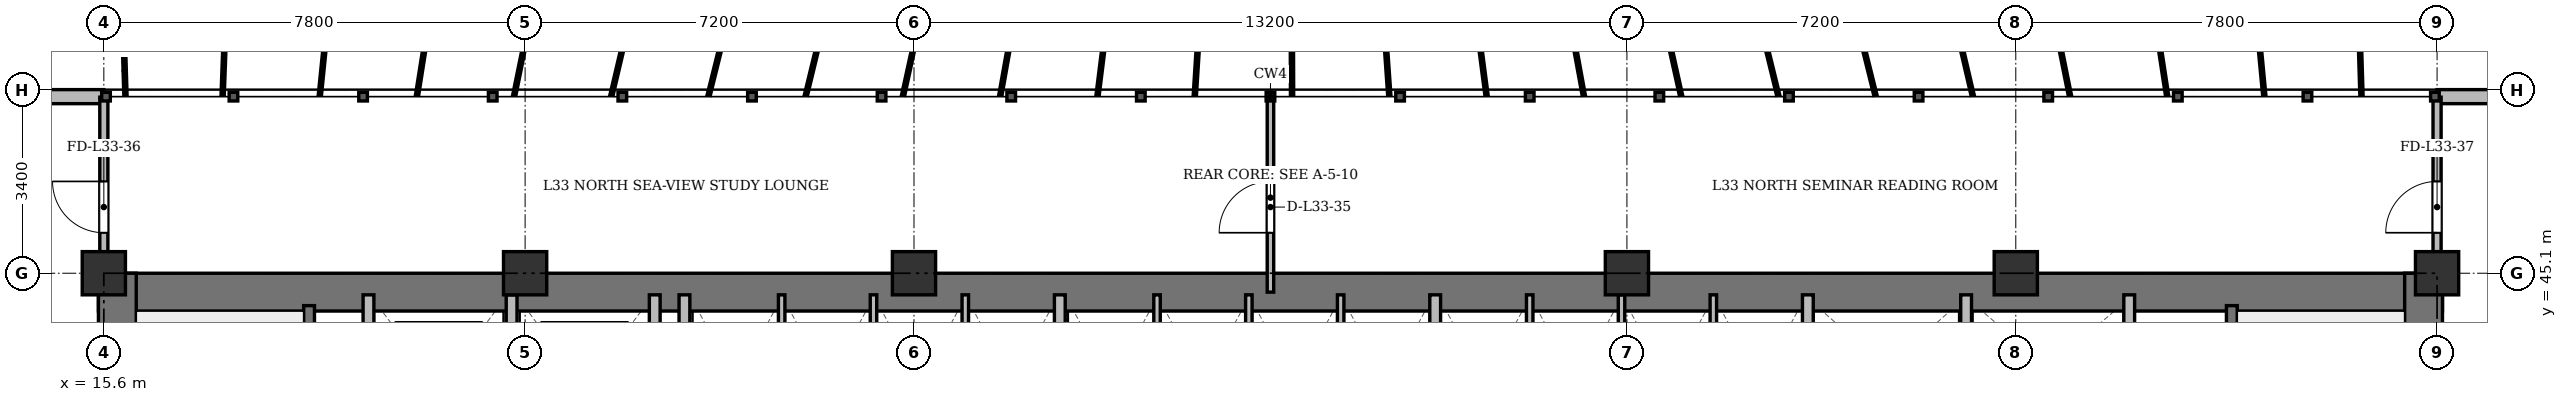
"""IFC4 building model, lengths in metres.
Left out: names, types, materials, properties, quantities, classifications, styles, units other than length and angle.
Written with IfcOpenShell. Run it as: python <this file> out.ifc"""

import sys

from ifc_helpers import new_model, si_unit, direction, frame, frame_2d, origin, origin_2d, place, context, subcontext, project, spatial, rectangle, extrude, source, transform, mapped, element, fill, save


model = new_model("IFC4")
c1 = context("Model", 3, precision=1e-05, world=origin(), true_north=direction((0.0, 1.0)))
c2 = subcontext(c1, "Body", "Model", "MODEL_VIEW")
j1 = project(units=[si_unit("LENGTHUNIT", "METRE"), si_unit("PLANEANGLEUNIT", "RADIAN")], contexts=[c1])
p1 = place(None, origin())
s1 = spatial("IfcSite", under=j1, at=p1, CompositionType="ELEMENT")
p2 = place(p1, origin())
s2 = spatial("IfcBuilding", under=s1, at=p2, CompositionType="ELEMENT")
p3 = place(p2, frame((0.0, 0.0, 128.5)))
s3 = spatial("IfcBuildingStorey", under=s2, at=p3, CompositionType="ELEMENT", Elevation=128.5)
m1 = source(origin(), c2, "Body", "SweptSolid", [
    extrude(rectangle(XDim=0.8, YDim=0.8, at=origin_2d()), origin(), (0.0, 0.0, 1.0), 3.6),
])
for number, where, z_axis, x_axis in (
    (1, (15.6, 45.1, 0.0), (0.0, 0.0, 1.0), (1.0, 0.0, 0.0)),
    (2, (23.4, 45.1, 0.0), (0.0, 0.0, 1.0), (1.0, 0.0, 0.0)),
    (3, (30.6, 45.1, 0.0), (0.0, 0.0, 1.0), (1.0, 0.0, 0.0)),
    (4, (43.8, 45.1, 0.0), (0.0, 0.0, 1.0), (1.0, 0.0, 0.0)),
    (5, (51.0, 45.1, 0.0), (0.0, 0.0, 1.0), (1.0, 0.0, 0.0)),
    (6, (58.8, 45.1, 0.0), (0.0, 0.0, 1.0), (1.0, 0.0, 0.0)),
):
    element("IfcColumn", number, at=place(p3, frame(where, z_axis=z_axis, x_axis=x_axis)), inside=s3, PredefinedType="COLUMN", context=c2, shape_type="MappedRepresentation", body=[
        mapped(m1, transform((0.0, 0.0, 0.0), x_axis=(1.0, 0.0, 0.0), y_axis=(0.0, 1.0, 0.0), z_axis=(0.0, 0.0, 1.0), scale=1.0)),
    ])
p4 = place(p3, frame((7.6, 48.37, 0.0), z_axis=(0.0, 0.0, 1.0), x_axis=(1.0, 0.0, 0.0)))
e7 = element("IfcWall", 7, at=p4, inside=s3, PredefinedType="SOLIDWALL", context=c2, shape_type="SweptSolid", body=[
    extrude(rectangle(XDim=8.0, YDim=0.26, at=frame_2d((4.0, 0.0))), origin(), (0.0, 0.0, 1.0), 3.22),
])
p5 = place(p4, frame((3.325, 0.0, 0.9)))
e8 = element("IfcOpeningElement", 8, at=p5, cuts=e7, PredefinedType="OPENING", context=c2, shape_type="SweptSolid", body=[
    extrude(rectangle(XDim=1.35, YDim=1.5, at=frame_2d((0.675, 0.75))), frame((0.0, 0.14, 0.0), z_axis=(0.0, -1.0, 0.0), x_axis=(1.0, 0.0, 0.0)), (0.0, 0.0, 1.0), 0.28),
])
p6 = place(p3, frame((58.8, 48.37, 0.0), z_axis=(0.0, 0.0, 1.0), x_axis=(1.0, 0.0, 0.0)))
e9 = element("IfcWall", 9, at=p6, inside=s3, PredefinedType="SOLIDWALL", context=c2, shape_type="SweptSolid", body=[
    extrude(rectangle(XDim=8.0, YDim=0.26, at=frame_2d((4.0, 0.0))), origin(), (0.0, 0.0, 1.0), 3.22),
])
p7 = place(p6, frame((3.325, 0.0, 0.9)))
e10 = element("IfcOpeningElement", 10, at=p7, cuts=e9, PredefinedType="OPENING", context=c2, shape_type="SweptSolid", body=[
    extrude(rectangle(XDim=1.35, YDim=1.5, at=frame_2d((0.675, 0.75))), frame((0.0, 0.14, 0.0), z_axis=(0.0, -1.0, 0.0), x_axis=(1.0, 0.0, 0.0)), (0.0, 0.0, 1.0), 0.28),
])
p8 = place(p3, frame((15.5, 44.75, 0.0), z_axis=(0.0, 0.0, 1.0), x_axis=(1.0, 0.0, 0.0)))
e11 = element("IfcWall", 11, at=p8, inside=s3, PredefinedType="SHEAR", context=c2, shape_type="SweptSolid", body=[
    extrude(rectangle(XDim=43.4, YDim=0.7, at=frame_2d((21.7, 0.0))), origin(), (0.0, 0.0, 1.0), 3.22),
])
for number, where, z_axis, x_axis in (
    (12, (15.85, 33.4, 0.0), (0.0, 0.0, 1.0), (0.0, 1.0, 0.0)),
    (13, (58.55, 33.4, 0.0), (0.0, 0.0, 1.0), (0.0, 1.0, 0.0)),
):
    element("IfcWall", number, at=place(p3, frame(where, z_axis=z_axis, x_axis=x_axis)), inside=s3, PredefinedType="SHEAR", context=c2, shape_type="SweptSolid", body=[
        extrude(rectangle(XDim=11.7, YDim=0.7, at=frame_2d((5.85, 0.0))), origin(), (0.0, 0.0, 1.0), 3.22),
    ])
p9 = place(p3, frame((19.4, 33.4, 0.0), z_axis=(0.0, 0.0, 1.0), x_axis=(0.0, 1.0, 0.0)))
e14 = element("IfcWall", 14, at=p9, inside=s3, PredefinedType="SHEAR", context=c2, shape_type="SweptSolid", body=[
    extrude(rectangle(XDim=11.1, YDim=0.2, at=frame_2d((5.55, 0.0))), origin(), (0.0, 0.0, 1.0), 3.22),
])
p10 = place(p9, frame((0.85, 0.0, 0.0)))
e15 = element("IfcOpeningElement", 15, at=p10, cuts=e14, PredefinedType="OPENING", context=c2, shape_type="SweptSolid", body=[
    extrude(rectangle(XDim=1.1, YDim=2.15, at=frame_2d((0.55, 1.075))), frame((0.0, 0.11, 0.0), z_axis=(0.0, -1.0, 0.0), x_axis=(1.0, 0.0, 0.0)), (0.0, 0.0, 1.0), 0.22),
])
p11 = place(p3, frame((55.0, 33.4, 0.0), z_axis=(0.0, 0.0, 1.0), x_axis=(0.0, 1.0, 0.0)))
e16 = element("IfcWall", 16, at=p11, inside=s3, PredefinedType="SHEAR", context=c2, shape_type="SweptSolid", body=[
    extrude(rectangle(XDim=11.1, YDim=0.2, at=frame_2d((5.55, 0.0))), origin(), (0.0, 0.0, 1.0), 3.22),
])
p12 = place(p11, frame((0.85, 0.0, 0.0)))
e17 = element("IfcOpeningElement", 17, at=p12, cuts=e16, PredefinedType="OPENING", context=c2, shape_type="SweptSolid", body=[
    extrude(rectangle(XDim=1.1, YDim=2.15, at=frame_2d((0.55, 1.075))), frame((0.0, 0.11, 0.0), z_axis=(0.0, -1.0, 0.0), x_axis=(1.0, 0.0, 0.0)), (0.0, 0.0, 1.0), 0.22),
])
for number, where, z_axis, x_axis in (
    (18, (20.5, 41.3, 0.0), (0.0, 0.0, 1.0), (0.0, 1.0, 0.0)),
    (19, (23.15, 41.3, 0.0), (0.0, 0.0, 1.0), (0.0, 1.0, 0.0)),
    (20, (25.8, 41.3, 0.0), (0.0, 0.0, 1.0), (0.0, 1.0, 0.0)),
):
    element("IfcWall", number, at=place(p3, frame(where, z_axis=z_axis, x_axis=x_axis)), inside=s3, PredefinedType="SOLIDWALL", context=c2, shape_type="SweptSolid", body=[
        extrude(rectangle(XDim=3.4, YDim=0.2, at=frame_2d((1.7, 0.0))), origin(), (0.0, 0.0, 1.0), 3.22),
    ])
p13 = place(p3, frame((26.35, 33.4, 0.0), z_axis=(0.0, 0.0, 1.0), x_axis=(0.0, 1.0, 0.0)))
e21 = element("IfcWall", 21, at=p13, inside=s3, PredefinedType="SOLIDWALL", context=c2, shape_type="SweptSolid", body=[
    extrude(rectangle(XDim=11.3, YDim=0.2, at=frame_2d((5.65, 0.0))), origin(), (0.0, 0.0, 1.0), 2.632),
])
p14 = place(p3, frame((33.3, 41.5, 0.0), z_axis=(0.0, 0.0, 1.0), x_axis=(0.0, 1.0, 0.0)))
e22 = element("IfcWall", 22, at=p14, inside=s3, PredefinedType="SOLIDWALL", context=c2, shape_type="SweptSolid", body=[
    extrude(rectangle(XDim=3.2, YDim=0.2, at=frame_2d((1.6, 0.0))), origin(), (0.0, 0.0, 1.0), 3.22),
])
for number, where, z_axis, x_axis in (
    (23, (28.15, 41.5, 0.0), (0.0, 0.0, 1.0), (0.0, 1.0, 0.0)),
    (24, (29.85, 41.5, 0.0), (0.0, 0.0, 1.0), (0.0, 1.0, 0.0)),
    (25, (31.55, 41.5, 0.0), (0.0, 0.0, 1.0), (0.0, 1.0, 0.0)),
    (26, (35.1, 41.5, 0.0), (0.0, 0.0, 1.0), (0.0, 1.0, 0.0)),
    (27, (36.8, 41.5, 0.0), (0.0, 0.0, 1.0), (0.0, 1.0, 0.0)),
    (28, (38.5, 41.5, 0.0), (0.0, 0.0, 1.0), (0.0, 1.0, 0.0)),
):
    element("IfcWall", number, at=place(p3, frame(where, z_axis=z_axis, x_axis=x_axis)), inside=s3, PredefinedType="PARTITIONING", context=c2, shape_type="SweptSolid", body=[
        extrude(rectangle(XDim=3.2, YDim=0.12, at=frame_2d((1.6, 0.0))), origin(), (0.0, 0.0, 1.0), 3.22),
    ])
p15 = place(p3, frame((40.25, 41.5, 0.0), z_axis=(0.0, 0.0, 1.0), x_axis=(0.0, 1.0, 0.0)))
e29 = element("IfcWall", 29, at=p15, inside=s3, PredefinedType="SOLIDWALL", context=c2, shape_type="SweptSolid", body=[
    extrude(rectangle(XDim=3.2, YDim=0.2, at=frame_2d((1.6, 0.0))), origin(), (0.0, 0.0, 1.0), 3.22),
])
p16 = place(p3, frame((42.0, 41.5, 0.0), z_axis=(0.0, 0.0, 1.0), x_axis=(0.0, 1.0, 0.0)))
e30 = element("IfcWall", 30, at=p16, inside=s3, PredefinedType="PARTITIONING", context=c2, shape_type="SweptSolid", body=[
    extrude(rectangle(XDim=3.2, YDim=0.12, at=frame_2d((1.6, 0.0))), origin(), (0.0, 0.0, 1.0), 3.22),
])
p17 = place(p3, frame((43.7, 41.5, 0.0), z_axis=(0.0, 0.0, 1.0), x_axis=(0.0, 1.0, 0.0)))
e31 = element("IfcWall", 31, at=p17, inside=s3, PredefinedType="PARTITIONING", context=c2, shape_type="SweptSolid", body=[
    extrude(rectangle(XDim=3.2, YDim=0.12, at=frame_2d((1.6, 0.0))), origin(), (0.0, 0.0, 1.0), 2.72),
])
p18 = place(p3, frame((45.4, 41.5, 0.0), z_axis=(0.0, 0.0, 1.0), x_axis=(0.0, 1.0, 0.0)))
e32 = element("IfcWall", 32, at=p18, inside=s3, PredefinedType="PARTITIONING", context=c2, shape_type="SweptSolid", body=[
    extrude(rectangle(XDim=3.2, YDim=0.12, at=frame_2d((1.6, 0.0))), origin(), (0.0, 0.0, 1.0), 3.22),
])
p19 = place(p3, frame((47.15, 33.4, 0.0), z_axis=(0.0, 0.0, 1.0), x_axis=(0.0, 1.0, 0.0)))
e33 = element("IfcWall", 33, at=p19, inside=s3, PredefinedType="SOLIDWALL", context=c2, shape_type="SweptSolid", body=[
    extrude(rectangle(XDim=11.3, YDim=0.2, at=frame_2d((5.65, 0.0))), origin(), (0.0, 0.0, 1.0), 2.632),
])
for number, where, z_axis, x_axis in (
    (34, (50.08, 42.05, 0.0), (0.0, 0.0, 1.0), (0.0, 1.0, 0.0)),
    (35, (53.1, 42.05, 0.0), (0.0, 0.0, 1.0), (0.0, 1.0, 0.0)),
):
    element("IfcWall", number, at=place(p3, frame(where, z_axis=z_axis, x_axis=x_axis)), inside=s3, PredefinedType="SOLIDWALL", context=c2, shape_type="SweptSolid", body=[
        extrude(rectangle(XDim=2.65, YDim=0.2, at=frame_2d((1.325, 0.0))), origin(), (0.0, 0.0, 1.0), 3.22),
    ])
p20 = place(p3, frame((37.2, 44.75, 0.0), z_axis=(0.0, 0.0, 1.0), x_axis=(0.0, 1.0, 0.0)))
e36 = element("IfcWall", 36, at=p20, inside=s3, PredefinedType="PARTITIONING", context=c2, shape_type="SweptSolid", body=[
    extrude(rectangle(XDim=3.61, YDim=0.12, at=frame_2d((1.805, 0.0))), origin(), (0.0, 0.0, 1.0), 2.632),
])
p21 = place(p20, frame((1.1, 0.0, 0.0)))
e37 = element("IfcOpeningElement", 37, at=p21, cuts=e36, PredefinedType="OPENING", context=c2, shape_type="SweptSolid", body=[
    extrude(rectangle(XDim=0.95, YDim=2.15, at=frame_2d((0.475, 1.075))), frame((0.0, 0.07, 0.0), z_axis=(0.0, -1.0, 0.0), x_axis=(1.0, 0.0, 0.0)), (0.0, 0.0, 1.0), 0.14),
])
p22 = place(p3, frame((15.6, 44.75, 0.0), z_axis=(0.0, 0.0, 1.0), x_axis=(0.0, 1.0, 0.0)))
e38 = element("IfcWall", 38, at=p22, inside=s3, PredefinedType="PARTITIONING", context=c2, shape_type="SweptSolid", body=[
    extrude(rectangle(XDim=3.61, YDim=0.15, at=frame_2d((1.805, 0.0))), origin(), (0.0, 0.0, 1.0), 2.72),
])
p23 = place(p22, frame((1.1, 0.0, 0.0)))
e39 = element("IfcOpeningElement", 39, at=p23, cuts=e38, PredefinedType="OPENING", context=c2, shape_type="SweptSolid", body=[
    extrude(rectangle(XDim=0.95, YDim=2.15, at=frame_2d((0.475, 1.075))), frame((0.0, 0.085, 0.0), z_axis=(0.0, -1.0, 0.0), x_axis=(1.0, 0.0, 0.0)), (0.0, 0.0, 1.0), 0.17),
])
p24 = place(p3, frame((58.8, 44.75, 0.0), z_axis=(0.0, 0.0, 1.0), x_axis=(0.0, 1.0, 0.0)))
e40 = element("IfcWall", 40, at=p24, inside=s3, PredefinedType="PARTITIONING", context=c2, shape_type="SweptSolid", body=[
    extrude(rectangle(XDim=3.61, YDim=0.15, at=frame_2d((1.805, 0.0))), origin(), (0.0, 0.0, 1.0), 2.72),
])
p25 = place(p24, frame((1.1, 0.0, 0.0)))
e41 = element("IfcOpeningElement", 41, at=p25, cuts=e40, PredefinedType="OPENING", context=c2, shape_type="SweptSolid", body=[
    extrude(rectangle(XDim=0.95, YDim=2.15, at=frame_2d((0.475, 1.075))), frame((0.0, 0.085, 0.0), z_axis=(0.0, -1.0, 0.0), x_axis=(1.0, 0.0, 0.0)), (0.0, 0.0, 1.0), 0.17),
])
m2 = source(origin(), c2, "Body", "SweptSolid", [
    extrude(rectangle(XDim=0.95, YDim=2.15, at=frame_2d((0.475, 1.075))), frame((0.0, 0.025, 0.0), z_axis=(0.0, -1.0, 0.0), x_axis=(1.0, 0.0, 0.0)), (0.0, 0.0, 1.0), 0.05),
])
p26 = place(p21, origin())
e42 = element("IfcDoor", 42, at=p26, inside=s3, OperationType="SINGLE_SWING_LEFT", PredefinedType="DOOR", context=c2, shape_type="MappedRepresentation", body=[
    mapped(m2, transform((0.0, 0.0, 0.0), x_axis=(1.0, 0.0, 0.0), y_axis=(0.0, 1.0, 0.0), z_axis=(0.0, 0.0, 1.0), scale=1.0)),
])
fill(e37, e42)
p27 = place(p23, origin())
e43 = element("IfcDoor", 43, at=p27, inside=s3, OperationType="SINGLE_SWING_RIGHT", PredefinedType="DOOR", context=c2, shape_type="MappedRepresentation", body=[
    mapped(m2, transform((0.0, 0.0, 0.0), x_axis=(1.0, 0.0, 0.0), y_axis=(0.0, 1.0, 0.0), z_axis=(0.0, 0.0, 1.0), scale=1.0)),
])
fill(e39, e43)
p28 = place(p25, origin())
e44 = element("IfcDoor", 44, at=p28, inside=s3, OperationType="SINGLE_SWING_LEFT", PredefinedType="DOOR", context=c2, shape_type="MappedRepresentation", body=[
    mapped(m2, transform((0.0, 0.0, 0.0), x_axis=(1.0, 0.0, 0.0), y_axis=(0.0, 1.0, 0.0), z_axis=(0.0, 0.0, 1.0), scale=1.0)),
])
fill(e41, e44)
save(model, sys.argv[1])
